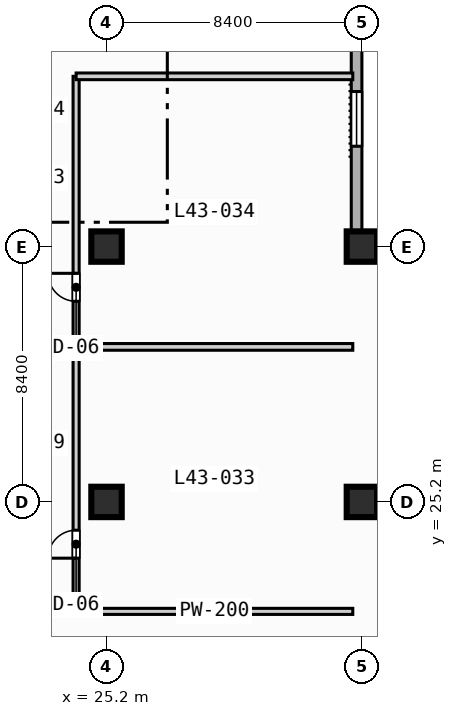
"""IFC4 building model, lengths in metres.
Left out: names, types, materials, properties, quantities, classifications, styles, units other than length and angle.
Written with IfcOpenShell. Run it as: python <this file> out.ifc"""

import sys

from ifc_helpers import new_model, si_unit, direction, frame, frame_2d, origin, origin_2d, place, context, subcontext, project, spatial, rectangle, extrude, element, fill, save


model = new_model("IFC4")
c1 = context("Model", 3, precision=1e-05, world=origin(), true_north=direction((0.0, 1.0)))
c2 = subcontext(c1, "Body", "Model", "MODEL_VIEW")
j1 = project(units=[si_unit("LENGTHUNIT", "METRE"), si_unit("PLANEANGLEUNIT", "RADIAN")], contexts=[c1])
p1 = place(None, origin())
s1 = spatial("IfcSite", under=j1, at=p1, CompositionType="ELEMENT")
p2 = place(p1, origin())
s2 = spatial("IfcBuilding", under=s1, at=p2, CompositionType="ELEMENT")
p3 = place(p2, frame((0.0, 0.0, 179.1)))
s3 = spatial("IfcBuildingStorey", under=s2, at=p3, CompositionType="ELEMENT", Elevation=179.1)
for number, where, z_axis, x_axis in (
    (1, (25.2, 25.2, 0.0), (0.0, 0.0, 1.0), (1.0, 0.0, 0.0)),
    (2, (25.2, 33.6, 0.0), (0.0, 0.0, 1.0), (1.0, 0.0, 0.0)),
    (3, (33.6, 25.2, 0.0), (0.0, 0.0, 1.0), (1.0, 0.0, 0.0)),
    (4, (33.6, 33.6, 0.0), (0.0, 0.0, 1.0), (1.0, 0.0, 0.0)),
):
    element("IfcColumn", number, at=place(p3, frame(where, z_axis=z_axis, x_axis=x_axis)), inside=s3, PredefinedType="COLUMN", context=c2, shape_type="SweptSolid", body=[
        extrude(rectangle(XDim=1.0, YDim=1.0, at=origin_2d()), origin(), (0.0, 0.0, 1.0), 3.7),
    ])
p4 = place(p3, frame((33.425, 72.425, 0.0), z_axis=(0.0, 0.0, 1.0), x_axis=(0.0, -1.0, 0.0)))
e5 = element("IfcWall", 5, at=p4, inside=s3, PredefinedType="STANDARD", context=c2, shape_type="SweptSolid", body=[
    extrude(rectangle(XDim=39.0, YDim=0.35, at=frame_2d((19.5, 0.0))), origin(), (0.0, 0.0, 1.0), 3.47),
])
p5 = place(p4, frame((33.725, 0.0, 0.85)))
e6 = element("IfcOpeningElement", 6, at=p5, cuts=e5, PredefinedType="OPENING", context=c2, shape_type="SweptSolid", body=[
    extrude(rectangle(XDim=1.8, YDim=1.8, at=frame_2d((0.9, 0.9))), frame((0.0, 0.185, 0.0), z_axis=(0.0, -1.0, 0.0), x_axis=(1.0, 0.0, 0.0)), (0.0, 0.0, 1.0), 0.37),
])
p6 = place(p4, frame((16.925, 0.0, 0.85)))
e7 = element("IfcOpeningElement", 7, at=p6, cuts=e5, PredefinedType="OPENING", context=c2, shape_type="SweptSolid", body=[
    extrude(rectangle(XDim=1.8, YDim=1.8, at=frame_2d((0.9, 0.9))), frame((0.0, 0.185, 0.0), z_axis=(0.0, -1.0, 0.0), x_axis=(1.0, 0.0, 0.0)), (0.0, 0.0, 1.0), 0.37),
])
p7 = place(p4, frame((8.225, 0.0, 0.85)))
e8 = element("IfcOpeningElement", 8, at=p7, cuts=e5, PredefinedType="OPENING", context=c2, shape_type="SweptSolid", body=[
    extrude(rectangle(XDim=2.4, YDim=1.95, at=frame_2d((1.2, 0.975))), frame((0.0, 0.185, 0.0), z_axis=(0.0, -1.0, 0.0), x_axis=(1.0, 0.0, 0.0)), (0.0, 0.0, 1.0), 0.37),
])
p8 = place(p3, frame((33.425, 33.425, 0.0), z_axis=(0.0, 0.0, 1.0), x_axis=(1.0, 0.0, 0.0)))
e9 = element("IfcWall", 9, at=p8, inside=s3, PredefinedType="STANDARD", context=c2, shape_type="SweptSolid", body=[
    extrude(rectangle(XDim=39.0, YDim=0.35, at=frame_2d((19.5, 0.0))), origin(), (0.0, 0.0, 1.0), 3.47),
])
p9 = place(p8, frame((12.075, 0.0, 0.0)))
e10 = element("IfcOpeningElement", 10, at=p9, cuts=e9, PredefinedType="OPENING", context=c2, shape_type="SweptSolid", body=[
    extrude(rectangle(XDim=1.4, YDim=2.2, at=frame_2d((0.7, 1.1))), frame((0.0, 0.185, 0.0), z_axis=(0.0, -1.0, 0.0), x_axis=(1.0, 0.0, 0.0)), (0.0, 0.0, 1.0), 0.37),
])
p10 = place(p8, frame((20.275, 0.0, 0.85)))
e11 = element("IfcOpeningElement", 11, at=p10, cuts=e9, PredefinedType="OPENING", context=c2, shape_type="SweptSolid", body=[
    extrude(rectangle(XDim=1.8, YDim=1.8, at=frame_2d((0.9, 0.9))), frame((0.0, 0.185, 0.0), z_axis=(0.0, -1.0, 0.0), x_axis=(1.0, 0.0, 0.0)), (0.0, 0.0, 1.0), 0.37),
])
p11 = place(p8, frame((28.375, 0.0, 0.85)))
e12 = element("IfcOpeningElement", 12, at=p11, cuts=e9, PredefinedType="OPENING", context=c2, shape_type="SweptSolid", body=[
    extrude(rectangle(XDim=2.4, YDim=1.95, at=frame_2d((1.2, 0.975))), frame((0.0, 0.185, 0.0), z_axis=(0.0, -1.0, 0.0), x_axis=(1.0, 0.0, 0.0)), (0.0, 0.0, 1.0), 0.37),
])
p12 = place(p3, frame((24.2, 21.6, 0.0), z_axis=(0.0, 0.0, 1.0), x_axis=(0.0, 1.0, 0.0)))
e13 = element("IfcWall", 13, at=p12, inside=s3, PredefinedType="PARTITIONING", context=c2, shape_type="SweptSolid", body=[
    extrude(rectangle(XDim=17.6, YDim=0.2, at=frame_2d((8.8, 0.0))), origin(), (0.0, 0.0, 1.0), 3.47),
])
p13 = place(p12, frame((1.75, 0.0, 0.0)))
e14 = element("IfcOpeningElement", 14, at=p13, cuts=e13, PredefinedType="OPENING", context=c2, shape_type="SweptSolid", body=[
    extrude(rectangle(XDim=0.92, YDim=2.1, at=frame_2d((0.46, 1.05))), frame((0.0, 0.11, 0.0), z_axis=(0.0, -1.0, 0.0), x_axis=(1.0, 0.0, 0.0)), (0.0, 0.0, 1.0), 0.22),
])
p14 = place(p12, frame((10.2, 0.0, 0.0)))
e15 = element("IfcOpeningElement", 15, at=p14, cuts=e13, PredefinedType="OPENING", context=c2, shape_type="SweptSolid", body=[
    extrude(rectangle(XDim=0.92, YDim=2.1, at=frame_2d((0.46, 1.05))), frame((0.0, 0.11, 0.0), z_axis=(0.0, -1.0, 0.0), x_axis=(1.0, 0.0, 0.0)), (0.0, 0.0, 1.0), 0.22),
])
p15 = place(p3, frame((24.2, 21.6, 0.0), z_axis=(0.0, 0.0, 1.0), x_axis=(1.0, 0.0, 0.0)))
e16 = element("IfcWall", 16, at=p15, inside=s3, PredefinedType="PARTITIONING", context=c2, shape_type="SweptSolid", body=[
    extrude(rectangle(XDim=9.1, YDim=0.2, at=frame_2d((4.55, 0.0))), origin(), (0.0, 0.0, 1.0), 3.47),
])
for number, where, z_axis, x_axis in (
    (17, (24.2, 30.3, 0.0), (0.0, 0.0, 1.0), (1.0, 0.0, 0.0)),
    (18, (24.2, 39.2, 0.0), (0.0, 0.0, 1.0), (1.0, 0.0, 0.0)),
):
    element("IfcWall", number, at=place(p3, frame(where, z_axis=z_axis, x_axis=x_axis)), inside=s3, PredefinedType="PARTITIONING", context=c2, shape_type="SweptSolid", body=[
        extrude(rectangle(XDim=9.1, YDim=0.22, at=frame_2d((4.55, 0.0))), origin(), (0.0, 0.0, 1.0), 3.47),
    ])
p16 = place(p5, origin())
e19 = element("IfcWindow", 19, at=p16, inside=s3, PartitioningType="SINGLE_PANEL", PredefinedType="WINDOW", context=c2, shape_type="SweptSolid", body=[
    extrude(rectangle(XDim=1.8, YDim=1.8, at=frame_2d((0.9, 0.9))), frame((0.0, 0.03, 0.0), z_axis=(0.0, -1.0, 0.0), x_axis=(1.0, 0.0, 0.0)), (0.0, 0.0, 1.0), 0.06),
])
fill(e6, e19)
p17 = place(p13, origin())
e20 = element("IfcDoor", 20, at=p17, inside=s3, OperationType="SINGLE_SWING_LEFT", PredefinedType="DOOR", context=c2, shape_type="SweptSolid", body=[
    extrude(rectangle(XDim=0.92, YDim=2.1, at=frame_2d((0.46, 1.05))), frame((0.0, 0.025, 0.0), z_axis=(0.0, -1.0, 0.0), x_axis=(1.0, 0.0, 0.0)), (0.0, 0.0, 1.0), 0.05),
])
fill(e14, e20)
p18 = place(p14, origin())
e21 = element("IfcDoor", 21, at=p18, inside=s3, OperationType="SINGLE_SWING_RIGHT", PredefinedType="DOOR", context=c2, shape_type="SweptSolid", body=[
    extrude(rectangle(XDim=0.92, YDim=2.1, at=frame_2d((0.46, 1.05))), frame((0.0, 0.025, 0.0), z_axis=(0.0, -1.0, 0.0), x_axis=(1.0, 0.0, 0.0)), (0.0, 0.0, 1.0), 0.05),
])
fill(e15, e21)
save(model, sys.argv[1])
